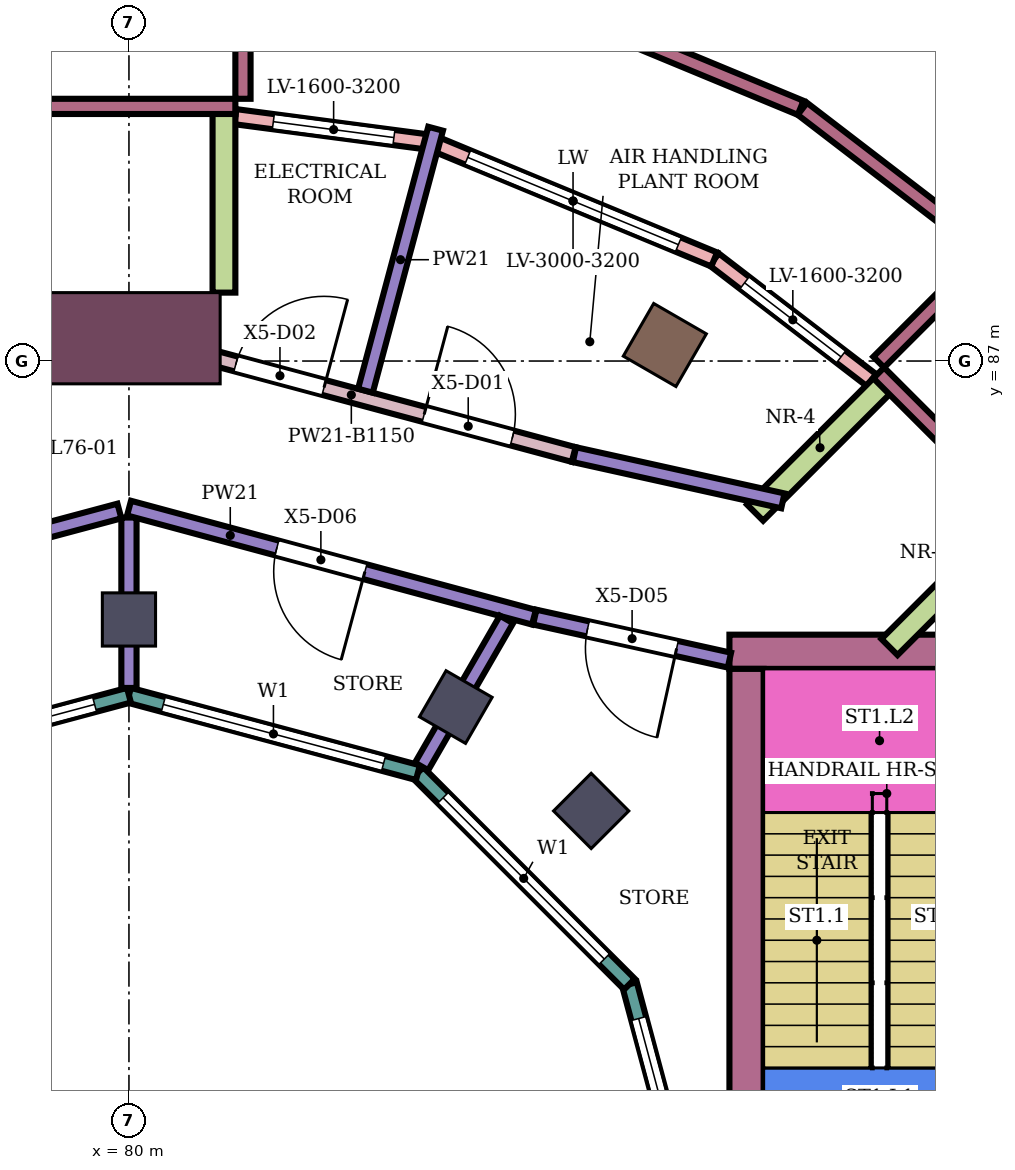
"""IFC4 building model, lengths in metres.
Left out: names, types, materials, properties, quantities, classifications, styles, units other than length and angle.
Written with IfcOpenShell. Run it as: python <this file> out.ifc"""

import sys

from ifc_helpers import new_model, si_unit, direction, frame, frame_2d, origin, origin_2d, place, context, subcontext, project, spatial, rectangle, extrude, element, fill, save


model = new_model("IFC4")
c1 = context("Model", 3, precision=1e-05, world=origin(), true_north=direction((0.0, 1.0)))
c2 = subcontext(c1, "Body", "Model", "MODEL_VIEW")
j1 = project(units=[si_unit("LENGTHUNIT", "METRE"), si_unit("PLANEANGLEUNIT", "RADIAN")], contexts=[c1])
p1 = place(None, origin())
s1 = spatial("IfcSite", under=j1, at=p1, CompositionType="ELEMENT")
p2 = place(p1, origin())
s2 = spatial("IfcBuilding", under=s1, at=p2, CompositionType="ELEMENT")
p3 = place(p2, frame((0.0, 0.0, 333.1)))
s3 = spatial("IfcBuildingStorey", under=s2, at=p3, CompositionType="ELEMENT", Elevation=333.1)
p4 = place(p3, frame((87.05, 87.211, 0.0), z_axis=(0.0, 0.0, 1.0), x_axis=(0.5, 0.866025403784, 0.0)))
e1 = element("IfcColumn", 1, at=p4, inside=s3, PredefinedType="COLUMN", context=c2, shape_type="SweptSolid", body=[
    extrude(rectangle(XDim=0.8, YDim=0.8, at=origin_2d()), origin(), (0.0, 0.0, 1.0), 4.5),
])
for number, where, z_axis, x_axis in (
    (2, (86.081, 81.081, 0.0), (0.0, 0.0, 1.0), (0.707, 0.707, 0.0)),
    (3, (84.3, 82.448, 0.0), (0.0, 0.0, 1.0), (0.5, 0.866, 0.0)),
    (4, (80.0, 83.6, 0.0), (0.0, 0.0, 1.0), (0.0, 1.0, 0.0)),
):
    element("IfcColumn", number, at=place(p3, frame(where, z_axis=z_axis, x_axis=x_axis)), inside=s3, PredefinedType="COLUMN", context=c2, shape_type="SweptSolid", body=[
        extrude(rectangle(XDim=0.7, YDim=0.7, at=origin_2d()), origin(), (0.0, 0.0, 1.0), 4.5),
    ])
p5 = place(p3, frame((80.0, 87.3, 0.0), z_axis=(0.0, 0.0, 1.0), x_axis=(0.0, 1.0, 0.0)))
e5 = element("IfcColumn", 5, at=p5, inside=s3, PredefinedType="COLUMN", context=c2, shape_type="SweptSolid", body=[
    extrude(rectangle(XDim=1.2, YDim=2.4, at=origin_2d()), origin(), (0.0, 0.0, 1.0), 4.5),
])
p6 = place(p3, frame((87.9, 83.175, 0.0), z_axis=(0.0, 0.0, 1.0), x_axis=(1.0, 0.0, 0.0)))
e6 = element("IfcWall", 6, at=p6, inside=s3, PredefinedType="SHEAR", context=c2, shape_type="SweptSolid", body=[
    extrude(rectangle(XDim=3.8, YDim=0.45, at=frame_2d((1.9, 0.0))), origin(), (0.0, 0.0, 1.0), 4.15),
])
p7 = place(p3, frame((88.125, 75.0, 0.0), z_axis=(0.0, 0.0, 1.0), x_axis=(0.0, 1.0, 0.0)))
e7 = element("IfcWall", 7, at=p7, inside=s3, PredefinedType="SHEAR", context=c2, shape_type="SweptSolid", body=[
    extrude(rectangle(XDim=7.95, YDim=0.45, at=frame_2d((3.975, 0.0))), origin(), (0.0, 0.0, 1.0), 4.15),
])
p8 = place(p3, frame((89.769, 86.749, 0.0), z_axis=(0.0, 0.0, 1.0), x_axis=(-0.793402901715, 0.608696833859, 0.0)))
e8 = element("IfcWall", 8, at=p8, inside=s3, PredefinedType="NOTDEFINED", context=c2, shape_type="SweptSolid", body=[
    extrude(rectangle(XDim=2.608, YDim=0.2, at=frame_2d((1.304, 0.0))), origin(), (0.0, 0.0, 1.0), 4.5),
])
p9 = place(p8, frame((0.504, 0.0, 0.5)))
e9 = element("IfcOpeningElement", 9, at=p9, cuts=e8, PredefinedType="OPENING", context=c2, shape_type="SweptSolid", body=[
    extrude(rectangle(XDim=1.6, YDim=3.2, at=frame_2d((0.8, 1.6))), frame((0.0, 0.11, 0.0), z_axis=(0.0, -1.0, 0.0), x_axis=(1.0, 0.0, 0.0)), (0.0, 0.0, 1.0), 0.22),
])
p10 = place(p3, frame((87.699, 88.336, 0.0), z_axis=(0.0, 0.0, 1.0), x_axis=(-0.923858417842, 0.38273440371, 0.0)))
e10 = element("IfcWall", 10, at=p10, inside=s3, PredefinedType="NOTDEFINED", context=c2, shape_type="SweptSolid", body=[
    extrude(rectangle(XDim=4.02, YDim=0.2, at=frame_2d((2.01, 0.0))), origin(), (0.0, 0.0, 1.0), 4.5),
])
p11 = place(p10, frame((0.51, 0.0, 0.5)))
e11 = element("IfcOpeningElement", 11, at=p11, cuts=e10, PredefinedType="OPENING", context=c2, shape_type="SweptSolid", body=[
    extrude(rectangle(XDim=3.0, YDim=3.2, at=frame_2d((1.5, 1.6))), frame((0.0, 0.11, 0.0), z_axis=(0.0, -1.0, 0.0), x_axis=(1.0, 0.0, 0.0)), (0.0, 0.0, 1.0), 0.22),
])
p12 = place(p3, frame((83.986, 89.875, 0.0), z_axis=(0.0, 0.0, 1.0), x_axis=(-0.991448878041, 0.130495678972, 0.0)))
e12 = element("IfcWall", 12, at=p12, inside=s3, PredefinedType="NOTDEFINED", context=c2, shape_type="SweptSolid", body=[
    extrude(rectangle(XDim=2.608, YDim=0.2, at=frame_2d((1.304, 0.0))), origin(), (0.0, 0.0, 1.0), 4.5),
])
p13 = place(p12, frame((0.504, 0.0, 0.5)))
e13 = element("IfcOpeningElement", 13, at=p13, cuts=e12, PredefinedType="OPENING", context=c2, shape_type="SweptSolid", body=[
    extrude(rectangle(XDim=1.6, YDim=3.2, at=frame_2d((0.8, 1.6))), frame((0.0, 0.11, 0.0), z_axis=(0.0, -1.0, 0.0), x_axis=(1.0, 0.0, 0.0)), (0.0, 0.0, 1.0), 0.22),
])
for number, where, z_axis, x_axis in (
    (14, (90.006, 83.238, 0.0), (0.0, 0.0, 1.0), (0.707, 0.707, 0.0)),
    (15, (88.238, 85.006, 0.0), (0.0, 0.0, 1.0), (0.707, 0.707, 0.0)),
    (16, (81.25, 87.9, 0.0), (0.0, 0.0, 1.0), (0.0, 1.0, 0.0)),
):
    element("IfcWall", number, at=place(p3, frame(where, z_axis=z_axis, x_axis=x_axis)), inside=s3, PredefinedType="NOTDEFINED", context=c2, shape_type="SweptSolid", body=[
        extrude(rectangle(XDim=2.416, YDim=0.3, at=frame_2d((1.208, 0.0))), origin(), (0.0, 0.0, 1.0), 4.5),
    ])
p14 = place(p3, frame((87.604, 75.0, 0.0), z_axis=(0.0, 0.0, 1.0), x_axis=(-0.258789828301, 0.965933654434, 0.0)))
e17 = element("IfcWall", 17, at=p14, inside=s3, PredefinedType="NOTDEFINED", context=c2, shape_type="SweptSolid", body=[
    extrude(rectangle(XDim=3.936, YDim=0.2, at=frame_2d((1.968, 0.0))), origin(), (0.0, 0.0, 1.0), 4.5),
])
p15 = place(p14, frame((0.468, 0.0, 0.9)))
e18 = element("IfcOpeningElement", 18, at=p15, cuts=e17, PredefinedType="OPENING", context=c2, shape_type="SweptSolid", body=[
    extrude(rectangle(XDim=3.0, YDim=2.3, at=frame_2d((1.5, 1.15))), frame((0.0, 0.11, 0.0), z_axis=(0.0, -1.0, 0.0), x_axis=(1.0, 0.0, 0.0)), (0.0, 0.0, 1.0), 0.22),
])
p16 = place(p3, frame((86.585, 78.802, 0.0), z_axis=(0.0, 0.0, 1.0), x_axis=(-0.707106781187, 0.707106781187, 0.0)))
e19 = element("IfcWall", 19, at=p16, inside=s3, PredefinedType="NOTDEFINED", context=c2, shape_type="SweptSolid", body=[
    extrude(rectangle(XDim=3.936, YDim=0.2, at=frame_2d((1.968, 0.0))), origin(), (0.0, 0.0, 1.0), 4.5),
])
p17 = place(p16, frame((0.468, 0.0, 0.9)))
e20 = element("IfcOpeningElement", 20, at=p17, cuts=e19, PredefinedType="OPENING", context=c2, shape_type="SweptSolid", body=[
    extrude(rectangle(XDim=3.0, YDim=2.3, at=frame_2d((1.5, 1.15))), frame((0.0, 0.11, 0.0), z_axis=(0.0, -1.0, 0.0), x_axis=(1.0, 0.0, 0.0)), (0.0, 0.0, 1.0), 0.22),
])
p18 = place(p3, frame((83.802, 81.585, 0.0), z_axis=(0.0, 0.0, 1.0), x_axis=(-0.965933654434, 0.258789828301, 0.0)))
e21 = element("IfcWall", 21, at=p18, inside=s3, PredefinedType="NOTDEFINED", context=c2, shape_type="SweptSolid", body=[
    extrude(rectangle(XDim=3.936, YDim=0.2, at=frame_2d((1.968, 0.0))), origin(), (0.0, 0.0, 1.0), 4.5),
])
p19 = place(p18, frame((0.468, 0.0, 0.9)))
e22 = element("IfcOpeningElement", 22, at=p19, cuts=e21, PredefinedType="OPENING", context=c2, shape_type="SweptSolid", body=[
    extrude(rectangle(XDim=3.0, YDim=2.3, at=frame_2d((1.5, 1.15))), frame((0.0, 0.11, 0.0), z_axis=(0.0, -1.0, 0.0), x_axis=(1.0, 0.0, 0.0)), (0.0, 0.0, 1.0), 0.22),
])
p20 = place(p3, frame((80.0, 82.604, 0.0), z_axis=(0.0, 0.0, 1.0), x_axis=(-0.965933654434, -0.258789828301, 0.0)))
e23 = element("IfcWall", 23, at=p20, inside=s3, PredefinedType="NOTDEFINED", context=c2, shape_type="SweptSolid", body=[
    extrude(rectangle(XDim=3.936, YDim=0.2, at=frame_2d((1.968, 0.0))), origin(), (0.0, 0.0, 1.0), 4.5),
])
p21 = place(p20, frame((0.468, 0.0, 0.9)))
e24 = element("IfcOpeningElement", 24, at=p21, cuts=e23, PredefinedType="OPENING", context=c2, shape_type="SweptSolid", body=[
    extrude(rectangle(XDim=3.0, YDim=2.3, at=frame_2d((1.5, 1.15))), frame((0.0, 0.11, 0.0), z_axis=(0.0, -1.0, 0.0), x_axis=(1.0, 0.0, 0.0)), (0.0, 0.0, 1.0), 0.22),
])
p22 = place(p3, frame((78.6, 90.35, 0.0), z_axis=(0.0, 0.0, 1.0), x_axis=(1.0, 0.0, 0.0)))
e25 = element("IfcWall", 25, at=p22, inside=s3, PredefinedType="PARAPET", context=c2, shape_type="SweptSolid", body=[
    extrude(rectangle(XDim=2.8, YDim=0.2, at=frame_2d((1.4, 0.0))), origin(), (0.0, 0.0, 1.0), 1.1),
])
p23 = place(p3, frame((81.5, 90.45, 0.0), z_axis=(0.0, 0.0, 1.0), x_axis=(0.0, 1.0, 0.0)))
e26 = element("IfcWall", 26, at=p23, inside=s3, PredefinedType="PARAPET", context=c2, shape_type="SweptSolid", body=[
    extrude(rectangle(XDim=1.936, YDim=0.2, at=frame_2d((0.968, 0.0))), origin(), (0.0, 0.0, 1.0), 1.1),
])
p24 = place(p3, frame((84.593, 92.089, 0.0), z_axis=(0.0, 0.0, 1.0), x_axis=(0.923884687805, -0.382670986147, 0.0)))
e27 = element("IfcWall", 27, at=p24, inside=s3, PredefinedType="PARAPET", context=c2, shape_type="SweptSolid", body=[
    extrude(rectangle(XDim=4.594, YDim=0.2, at=frame_2d((2.297, 0.0))), origin(), (0.0, 0.0, 1.0), 1.1),
])
p25 = place(p3, frame((88.859, 90.318, 0.0), z_axis=(0.0, 0.0, 1.0), x_axis=(0.79335441758, -0.608760025056, 0.0)))
e28 = element("IfcWall", 28, at=p25, inside=s3, PredefinedType="PARAPET", context=c2, shape_type="SweptSolid", body=[
    extrude(rectangle(XDim=2.98, YDim=0.2, at=frame_2d((1.49, 0.0))), origin(), (0.0, 0.0, 1.0), 1.1),
])
p26 = place(p3, frame((91.233, 88.354, 0.0), z_axis=(0.0, 0.0, 1.0), x_axis=(-0.707043717037, -0.707169839712, 0.0)))
e29 = element("IfcWall", 29, at=p26, inside=s3, PredefinedType="PARAPET", context=c2, shape_type="SweptSolid", body=[
    extrude(rectangle(XDim=1.936, YDim=0.2, at=frame_2d((0.968, 0.0))), origin(), (0.0, 0.0, 1.0), 1.1),
])
p27 = place(p3, frame((89.864, 86.844, 0.0), z_axis=(0.0, 0.0, 1.0), x_axis=(0.707106781187, -0.707106781187, 0.0)))
e30 = element("IfcWall", 30, at=p27, inside=s3, PredefinedType="PARAPET", context=c2, shape_type="SweptSolid", body=[
    extrude(rectangle(XDim=2.8, YDim=0.2, at=frame_2d((1.4, 0.0))), origin(), (0.0, 0.0, 1.0), 1.1),
])
p28 = place(p3, frame((74.139, 85.768, 0.0), z_axis=(0.0, 0.0, 1.0), x_axis=(0.965901504328, 0.258909798842, 0.0)))
e31 = element("IfcWall", 31, at=p28, inside=s3, PredefinedType="PARTITIONING", context=c2, shape_type="SweptSolid", body=[
    extrude(rectangle(XDim=6.018, YDim=0.2, at=frame_2d((3.009, 0.0))), origin(), (0.0, 0.0, 1.0), 3.35),
])
p29 = place(p28, frame((2.434, 0.0, 0.0)))
e32 = element("IfcOpeningElement", 32, at=p29, cuts=e31, PredefinedType="OPENING", context=c2, shape_type="SweptSolid", body=[
    extrude(rectangle(XDim=1.2, YDim=2.4, at=frame_2d((0.6, 1.2))), frame((0.0, 0.11, 0.0), z_axis=(0.0, -1.0, 0.0), x_axis=(1.0, 0.0, 0.0)), (0.0, 0.0, 1.0), 0.22),
])
p30 = place(p3, frame((74.661, 83.631, 0.0), z_axis=(0.0, 0.0, 1.0), x_axis=(0.965971667126, 0.258647904127, 0.0)))
e33 = element("IfcWall", 33, at=p30, inside=s3, PredefinedType="PARTITIONING", context=c2, shape_type="SweptSolid", body=[
    extrude(rectangle(XDim=5.397, YDim=0.2, at=frame_2d((2.699, 0.0))), origin(), (0.0, 0.0, 1.0), 4.05),
])
p31 = place(p30, frame((2.313, 0.0, 0.0)))
e34 = element("IfcOpeningElement", 34, at=p31, cuts=e33, PredefinedType="OPENING", context=c2, shape_type="SweptSolid", body=[
    extrude(rectangle(XDim=1.2, YDim=2.4, at=frame_2d((0.6, 1.2))), frame((0.0, 0.11, 0.0), z_axis=(0.0, -1.0, 0.0), x_axis=(1.0, 0.0, 0.0)), (0.0, 0.0, 1.0), 0.22),
])
p32 = place(p3, frame((80.0, 82.699, 0.0), z_axis=(0.0, 0.0, 1.0), x_axis=(0.0, 1.0, 0.0)))
e35 = element("IfcWall", 35, at=p32, inside=s3, PredefinedType="PARTITIONING", context=c2, shape_type="SweptSolid", body=[
    extrude(rectangle(XDim=2.242, YDim=0.2, at=frame_2d((1.121, 0.0))), origin(), (0.0, 0.0, 1.0), 4.05),
])
p33 = place(p3, frame((80.0, 87.339, 0.0), z_axis=(0.0, 0.0, 1.0), x_axis=(0.96586472806, -0.259046959234, 0.0)))
e36 = element("IfcWall", 36, at=p33, inside=s3, PredefinedType="PARTITIONING", context=c2, shape_type="SweptSolid", body=[
    extrude(rectangle(XDim=6.058, YDim=0.2, at=frame_2d((3.029, 0.0))), origin(), (0.0, 0.0, 1.0), 3.35),
])
p34 = place(p33, frame((4.021, 0.0, 0.0)))
e37 = element("IfcOpeningElement", 37, at=p34, cuts=e36, PredefinedType="OPENING", context=c2, shape_type="SweptSolid", body=[
    extrude(rectangle(XDim=1.2, YDim=2.4, at=frame_2d((0.6, 1.2))), frame((0.0, 0.11, 0.0), z_axis=(0.0, -1.0, 0.0), x_axis=(1.0, 0.0, 0.0)), (0.0, 0.0, 1.0), 0.22),
])
p35 = place(p33, frame((1.457, 0.0, 0.0)))
e38 = element("IfcOpeningElement", 38, at=p35, cuts=e36, PredefinedType="OPENING", context=c2, shape_type="SweptSolid", body=[
    extrude(rectangle(XDim=1.2, YDim=2.4, at=frame_2d((0.6, 1.2))), frame((0.0, 0.11, 0.0), z_axis=(0.0, -1.0, 0.0), x_axis=(1.0, 0.0, 0.0)), (0.0, 0.0, 1.0), 0.22),
])
p36 = place(p3, frame((80.001, 85.065, 0.0), z_axis=(0.0, 0.0, 1.0), x_axis=(0.965552921813, -0.260206754675, 0.0)))
e39 = element("IfcWall", 39, at=p36, inside=s3, PredefinedType="PARTITIONING", context=c2, shape_type="SweptSolid", body=[
    extrude(rectangle(XDim=5.517, YDim=0.2, at=frame_2d((2.758, 0.0))), origin(), (0.0, 0.0, 1.0), 4.05),
])
p37 = place(p36, frame((2.014, 0.0, 0.0)))
e40 = element("IfcOpeningElement", 40, at=p37, cuts=e39, PredefinedType="OPENING", context=c2, shape_type="SweptSolid", body=[
    extrude(rectangle(XDim=1.2, YDim=2.4, at=frame_2d((0.6, 1.2))), frame((0.0, 0.11, 0.0), z_axis=(0.0, -1.0, 0.0), x_axis=(1.0, 0.0, 0.0)), (0.0, 0.0, 1.0), 0.22),
])
p38 = place(p3, frame((83.111, 86.61, 0.0), z_axis=(0.0, 0.0, 1.0), x_axis=(0.258761164689, 0.965941333441, 0.0)))
e41 = element("IfcWall", 41, at=p38, inside=s3, PredefinedType="PARTITIONING", context=c2, shape_type="SweptSolid", body=[
    extrude(rectangle(XDim=3.568, YDim=0.2, at=frame_2d((1.784, 0.0))), origin(), (0.0, 0.0, 1.0), 4.05),
])
p39 = place(p3, frame((83.85, 81.667, 0.0), z_axis=(0.0, 0.0, 1.0), x_axis=(0.500066293759, 0.865987125681, 0.0)))
e42 = element("IfcWall", 42, at=p39, inside=s3, PredefinedType="PARTITIONING", context=c2, shape_type="SweptSolid", body=[
    extrude(rectangle(XDim=2.233, YDim=0.2, at=frame_2d((1.117, 0.0))), origin(), (0.0, 0.0, 1.0), 4.05),
])
p40 = place(p3, frame((85.339, 83.631, 0.0), z_axis=(0.0, 0.0, 1.0), x_axis=(0.976420858197, -0.215875676438, 0.0)))
e43 = element("IfcWall", 43, at=p40, inside=s3, PredefinedType="PARTITIONING", context=c2, shape_type="SweptSolid", body=[
    extrude(rectangle(XDim=2.623, YDim=0.2, at=frame_2d((1.311, 0.0))), origin(), (0.0, 0.0, 1.0), 4.05),
])
p41 = place(p40, frame((0.711, 0.0, 0.0)))
e44 = element("IfcOpeningElement", 44, at=p41, cuts=e43, PredefinedType="OPENING", context=c2, shape_type="SweptSolid", body=[
    extrude(rectangle(XDim=1.2, YDim=2.4, at=frame_2d((0.6, 1.2))), frame((0.0, 0.11, 0.0), z_axis=(0.0, -1.0, 0.0), x_axis=(1.0, 0.0, 0.0)), (0.0, 0.0, 1.0), 0.22),
])
p42 = place(p3, frame((85.861, 85.768, 0.0), z_axis=(0.0, 0.0, 1.0), x_axis=(0.976315738101, -0.216350594029, 0.0)))
e45 = element("IfcWall", 45, at=p42, inside=s3, PredefinedType="PARTITIONING", context=c2, shape_type="SweptSolid", body=[
    extrude(rectangle(XDim=2.809, YDim=0.2, at=frame_2d((1.404, 0.0))), origin(), (0.0, 0.0, 1.0), 4.05),
])
p43 = place(p9, origin())
e46 = element("IfcWindow", 46, at=p43, inside=s3, PartitioningType="SINGLE_PANEL", PredefinedType="USERDEFINED", context=c2, shape_type="SweptSolid", body=[
    extrude(rectangle(XDim=1.6, YDim=3.2, at=frame_2d((0.8, 1.6))), frame((0.0, 0.03, 0.0), z_axis=(0.0, -1.0, 0.0), x_axis=(1.0, 0.0, 0.0)), (0.0, 0.0, 1.0), 0.06),
])
fill(e9, e46)
p44 = place(p11, origin())
e47 = element("IfcWindow", 47, at=p44, inside=s3, PartitioningType="SINGLE_PANEL", PredefinedType="USERDEFINED", context=c2, shape_type="SweptSolid", body=[
    extrude(rectangle(XDim=3.0, YDim=3.2, at=frame_2d((1.5, 1.6))), frame((0.0, 0.03, 0.0), z_axis=(0.0, -1.0, 0.0), x_axis=(1.0, 0.0, 0.0)), (0.0, 0.0, 1.0), 0.06),
])
fill(e11, e47)
p45 = place(p13, origin())
e48 = element("IfcWindow", 48, at=p45, inside=s3, PartitioningType="SINGLE_PANEL", PredefinedType="USERDEFINED", context=c2, shape_type="SweptSolid", body=[
    extrude(rectangle(XDim=1.6, YDim=3.2, at=frame_2d((0.8, 1.6))), frame((0.0, 0.03, 0.0), z_axis=(0.0, -1.0, 0.0), x_axis=(1.0, 0.0, 0.0)), (0.0, 0.0, 1.0), 0.06),
])
fill(e13, e48)
p46 = place(p15, origin())
e49 = element("IfcWindow", 49, at=p46, inside=s3, PartitioningType="SINGLE_PANEL", PredefinedType="WINDOW", context=c2, shape_type="SweptSolid", body=[
    extrude(rectangle(XDim=3.0, YDim=2.3, at=frame_2d((1.5, 1.15))), frame((0.0, 0.03, 0.0), z_axis=(0.0, -1.0, 0.0), x_axis=(1.0, 0.0, 0.0)), (0.0, 0.0, 1.0), 0.06),
])
fill(e18, e49)
p47 = place(p17, origin())
e50 = element("IfcWindow", 50, at=p47, inside=s3, PartitioningType="SINGLE_PANEL", PredefinedType="WINDOW", context=c2, shape_type="SweptSolid", body=[
    extrude(rectangle(XDim=3.0, YDim=2.3, at=frame_2d((1.5, 1.15))), frame((0.0, 0.03, 0.0), z_axis=(0.0, -1.0, 0.0), x_axis=(1.0, 0.0, 0.0)), (0.0, 0.0, 1.0), 0.06),
])
fill(e20, e50)
p48 = place(p19, origin())
e51 = element("IfcWindow", 51, at=p48, inside=s3, PartitioningType="SINGLE_PANEL", PredefinedType="WINDOW", context=c2, shape_type="SweptSolid", body=[
    extrude(rectangle(XDim=3.0, YDim=2.3, at=frame_2d((1.5, 1.15))), frame((0.0, 0.03, 0.0), z_axis=(0.0, -1.0, 0.0), x_axis=(1.0, 0.0, 0.0)), (0.0, 0.0, 1.0), 0.06),
])
fill(e22, e51)
p49 = place(p21, origin())
e52 = element("IfcWindow", 52, at=p49, inside=s3, PartitioningType="SINGLE_PANEL", PredefinedType="WINDOW", context=c2, shape_type="SweptSolid", body=[
    extrude(rectangle(XDim=3.0, YDim=2.3, at=frame_2d((1.5, 1.15))), frame((0.0, 0.03, 0.0), z_axis=(0.0, -1.0, 0.0), x_axis=(1.0, 0.0, 0.0)), (0.0, 0.0, 1.0), 0.06),
])
fill(e24, e52)
p50 = place(p34, origin())
e53 = element("IfcDoor", 53, at=p50, inside=s3, OperationType="SINGLE_SWING_LEFT", PredefinedType="DOOR", context=c2, shape_type="SweptSolid", body=[
    extrude(rectangle(XDim=1.2, YDim=2.4, at=frame_2d((0.6, 1.2))), frame((0.0, 0.025, 0.0), z_axis=(0.0, -1.0, 0.0), x_axis=(1.0, 0.0, 0.0)), (0.0, 0.0, 1.0), 0.05),
])
fill(e37, e53)
p51 = place(p35, origin())
e54 = element("IfcDoor", 54, at=p51, inside=s3, OperationType="SINGLE_SWING_RIGHT", PredefinedType="DOOR", context=c2, shape_type="SweptSolid", body=[
    extrude(rectangle(XDim=1.2, YDim=2.4, at=frame_2d((0.6, 1.2))), frame((0.0, 0.025, 0.0), z_axis=(0.0, -1.0, 0.0), x_axis=(1.0, 0.0, 0.0)), (0.0, 0.0, 1.0), 0.05),
])
fill(e38, e54)
p52 = place(p41, frame((1.2, 0.0, 0.0), z_axis=(0.0, 0.0, 1.0), x_axis=(-1.0, 0.0, 0.0)))
e55 = element("IfcDoor", 55, at=p52, inside=s3, OperationType="SINGLE_SWING_LEFT", PredefinedType="DOOR", context=c2, shape_type="SweptSolid", body=[
    extrude(rectangle(XDim=1.2, YDim=2.4, at=frame_2d((0.6, 1.2))), frame((0.0, 0.025, 0.0), z_axis=(0.0, -1.0, 0.0), x_axis=(1.0, 0.0, 0.0)), (0.0, 0.0, 1.0), 0.05),
])
fill(e44, e55)
p53 = place(p37, frame((1.2, 0.0, 0.0), z_axis=(0.0, 0.0, 1.0), x_axis=(-1.0, 0.0, 0.0)))
e56 = element("IfcDoor", 56, at=p53, inside=s3, OperationType="SINGLE_SWING_LEFT", PredefinedType="DOOR", context=c2, shape_type="SweptSolid", body=[
    extrude(rectangle(XDim=1.2, YDim=2.4, at=frame_2d((0.6, 1.2))), frame((0.0, 0.025, 0.0), z_axis=(0.0, -1.0, 0.0), x_axis=(1.0, 0.0, 0.0)), (0.0, 0.0, 1.0), 0.05),
])
fill(e40, e56)
save(model, sys.argv[1])
